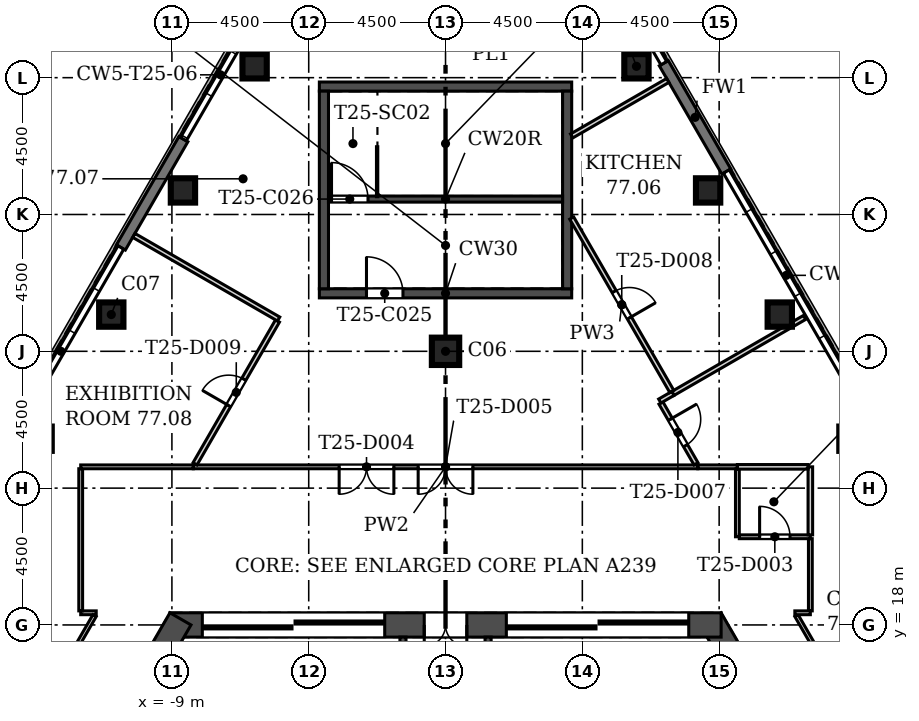
"""IFC4 building model, lengths in metres.
Left out: names, types, materials, properties, quantities, classifications, styles, units other than length and angle.
Written with IfcOpenShell. Run it as: python <this file> out.ifc"""

import sys

from ifc_helpers import new_model, si_unit, direction, frame, frame_2d, origin, origin_2d, place, context, subcontext, project, spatial, rectangle, extrude, element, fill, save


model = new_model("IFC4")
c1 = context("Model", 3, precision=1e-05, world=origin(), true_north=direction((0.0, 1.0)))
c2 = subcontext(c1, "Body", "Model", "MODEL_VIEW")
j1 = project(units=[si_unit("LENGTHUNIT", "METRE"), si_unit("PLANEANGLEUNIT", "RADIAN")], contexts=[c1])
p1 = place(None, origin())
s1 = spatial("IfcSite", under=j1, at=p1, CompositionType="ELEMENT")
p2 = place(p1, origin())
s2 = spatial("IfcBuilding", under=s1, at=p2, CompositionType="ELEMENT")
p3 = place(p2, frame((0.0, 0.0, 339.3)))
s3 = spatial("IfcBuildingStorey", under=s2, at=p3, CompositionType="ELEMENT", Elevation=339.3)
for number, where, z_axis, x_axis in (
    (1, (10.994, 28.208, 0.0), (0.0, 0.0, 1.0), (1.0, 0.0, 0.0)),
    (2, (8.637, 32.291, 0.0), (0.0, 0.0, 1.0), (1.0, 0.0, 0.0)),
    (3, (6.28, 36.374, 0.0), (0.0, 0.0, 1.0), (1.0, 0.0, 0.0)),
    (4, (-6.28, 36.374, 0.0), (0.0, 0.0, 1.0), (1.0, 0.0, 0.0)),
    (5, (-8.637, 32.291, 0.0), (0.0, 0.0, 1.0), (1.0, 0.0, 0.0)),
    (6, (-10.994, 28.208, 0.0), (0.0, 0.0, 1.0), (1.0, 0.0, 0.0)),
):
    element("IfcColumn", number, at=place(p3, frame(where, z_axis=z_axis, x_axis=x_axis)), inside=s3, PredefinedType="COLUMN", context=c2, shape_type="SweptSolid", body=[
        extrude(rectangle(XDim=0.8, YDim=0.8, at=origin_2d()), origin(), (0.0, 0.0, 1.0), 5.4),
    ])
p4 = place(p3, frame((0.0, 27.0, 0.0), z_axis=(0.0, 0.0, 1.0), x_axis=(1.0, 0.0, 0.0)))
e7 = element("IfcColumn", 7, at=p4, inside=s3, PredefinedType="COLUMN", context=c2, shape_type="SweptSolid", body=[
    extrude(rectangle(XDim=0.9, YDim=0.9, at=origin_2d()), origin(), (0.0, 0.0, 1.0), 5.4),
])
p5 = place(p3, frame((13.054, 10.692, 0.0), z_axis=(0.0, 0.0, 1.0), x_axis=(-0.500015780397, 0.866016292776, 0.0)))
e8 = element("IfcWall", 8, at=p5, inside=s3, PredefinedType="SHEAR", context=c2, shape_type="SweptSolid", body=[
    extrude(rectangle(XDim=8.67, YDim=0.8, at=frame_2d((4.335, 0.0))), origin(), (0.0, 0.0, 1.0), 5.4),
])
p6 = place(p3, frame((9.065, 18.0, 0.0), z_axis=(0.0, 0.0, 1.0), x_axis=(-1.0, 0.0, 0.0)))
e9 = element("IfcWall", 9, at=p6, inside=s3, PredefinedType="SHEAR", context=c2, shape_type="SweptSolid", body=[
    extrude(rectangle(XDim=18.13, YDim=0.8, at=frame_2d((9.065, 0.0))), origin(), (0.0, 0.0, 1.0), 5.4),
])
p7 = place(p6, frame((8.365, 0.0, 0.0)))
e10 = element("IfcOpeningElement", 10, at=p7, cuts=e9, PredefinedType="OPENING", context=c2, shape_type="SweptSolid", body=[
    extrude(rectangle(XDim=1.4, YDim=2.1, at=frame_2d((0.7, 1.05))), frame((0.0, 0.41, 0.0), z_axis=(0.0, -1.0, 0.0), x_axis=(1.0, 0.0, 0.0)), (0.0, 0.0, 1.0), 0.82),
])
p8 = place(p6, frame((11.065, 0.0, 0.0)))
e11 = element("IfcOpeningElement", 11, at=p8, cuts=e9, PredefinedType="OPENING", context=c2, shape_type="SweptSolid", body=[
    extrude(rectangle(XDim=6.0, YDim=2.4, at=frame_2d((3.0, 1.2))), frame((0.0, 0.41, 0.0), z_axis=(0.0, -1.0, 0.0), x_axis=(1.0, 0.0, 0.0)), (0.0, 0.0, 1.0), 0.82),
])
p9 = place(p6, frame((1.065, 0.0, 0.0)))
e12 = element("IfcOpeningElement", 12, at=p9, cuts=e9, PredefinedType="OPENING", context=c2, shape_type="SweptSolid", body=[
    extrude(rectangle(XDim=6.0, YDim=2.4, at=frame_2d((3.0, 1.2))), frame((0.0, 0.41, 0.0), z_axis=(0.0, -1.0, 0.0), x_axis=(1.0, 0.0, 0.0)), (0.0, 0.0, 1.0), 0.82),
])
p10 = place(p3, frame((-8.719, 18.2, 0.0), z_axis=(0.0, 0.0, 1.0), x_axis=(-0.500015780397, -0.866016292776, 0.0)))
e13 = element("IfcWall", 13, at=p10, inside=s3, PredefinedType="SHEAR", context=c2, shape_type="SweptSolid", body=[
    extrude(rectangle(XDim=8.67, YDim=0.8, at=frame_2d((4.335, 0.0))), origin(), (0.0, 0.0, 1.0), 5.4),
])
for number, where, z_axis, x_axis in (
    (14, (9.237, 32.913, 0.0), (0.0, 0.0, 1.0), (-0.5, 0.866, 0.0)),
    (15, (-8.622, 33.978, 0.0), (0.0, 0.0, 1.0), (-0.5, -0.866, 0.0)),
):
    element("IfcWall", number, at=place(p3, frame(where, z_axis=z_axis, x_axis=x_axis)), inside=s3, PredefinedType="SOLIDWALL", context=c2, shape_type="SweptSolid", body=[
        extrude(rectangle(XDim=4.115, YDim=0.34, at=frame_2d((2.058, 0.0))), origin(), (0.0, 0.0, 1.0), 4.6),
    ])
p11 = place(p3, frame((-1.4, 5.85, -0.4), z_axis=(0.0, 0.0, 1.0), x_axis=(0.0, 1.0, 0.0)))
e16 = element("IfcWall", 16, at=p11, inside=s3, PredefinedType="SOLIDWALL", context=c2, shape_type="SweptSolid", body=[
    extrude(rectangle(XDim=11.75, YDim=0.2, at=frame_2d((5.875, 0.0))), origin(), (0.0, 0.0, 1.0), 5.0),
])
p12 = place(p11, frame((0.65, 0.0, 0.4)))
e17 = element("IfcOpeningElement", 17, at=p12, cuts=e16, PredefinedType="OPENING", context=c2, shape_type="SweptSolid", body=[
    extrude(rectangle(XDim=1.1, YDim=2.1, at=frame_2d((0.55, 1.05))), frame((0.0, 0.11, 0.0), z_axis=(0.0, -1.0, 0.0), x_axis=(1.0, 0.0, 0.0)), (0.0, 0.0, 1.0), 0.22),
])
p13 = place(p11, frame((3.3, 0.0, 0.4)))
e18 = element("IfcOpeningElement", 18, at=p13, cuts=e16, PredefinedType="OPENING", context=c2, shape_type="SweptSolid", body=[
    extrude(rectangle(XDim=1.0, YDim=2.1, at=frame_2d((0.5, 1.05))), frame((0.0, 0.11, 0.0), z_axis=(0.0, -1.0, 0.0), x_axis=(1.0, 0.0, 0.0)), (0.0, 0.0, 1.0), 0.22),
])
p14 = place(p11, frame((7.2, 0.0, 0.4)))
e19 = element("IfcOpeningElement", 19, at=p14, cuts=e16, PredefinedType="OPENING", context=c2, shape_type="SweptSolid", body=[
    extrude(rectangle(XDim=1.0, YDim=2.1, at=frame_2d((0.5, 1.05))), frame((0.0, 0.11, 0.0), z_axis=(0.0, -1.0, 0.0), x_axis=(1.0, 0.0, 0.0)), (0.0, 0.0, 1.0), 0.22),
])
p15 = place(p3, frame((1.4, 5.85, -0.4), z_axis=(0.0, 0.0, 1.0), x_axis=(0.0, 1.0, 0.0)))
e20 = element("IfcWall", 20, at=p15, inside=s3, PredefinedType="SOLIDWALL", context=c2, shape_type="SweptSolid", body=[
    extrude(rectangle(XDim=11.75, YDim=0.2, at=frame_2d((5.875, 0.0))), origin(), (0.0, 0.0, 1.0), 5.0),
])
p16 = place(p15, frame((3.2, 0.0, 0.4)))
e21 = element("IfcOpeningElement", 21, at=p16, cuts=e20, PredefinedType="OPENING", context=c2, shape_type="SweptSolid", body=[
    extrude(rectangle(XDim=1.2, YDim=2.1, at=frame_2d((0.6, 1.05))), frame((0.0, 0.11, 0.0), z_axis=(0.0, -1.0, 0.0), x_axis=(1.0, 0.0, 0.0)), (0.0, 0.0, 1.0), 0.22),
])
p17 = place(p15, frame((0.65, 0.0, 0.4)))
e22 = element("IfcOpeningElement", 22, at=p17, cuts=e20, PredefinedType="OPENING", context=c2, shape_type="SweptSolid", body=[
    extrude(rectangle(XDim=1.1, YDim=2.1, at=frame_2d((0.55, 1.05))), frame((0.0, 0.11, 0.0), z_axis=(0.0, -1.0, 0.0), x_axis=(1.0, 0.0, 0.0)), (0.0, 0.0, 1.0), 0.22),
])
p18 = place(p15, frame((5.9, 0.0, 0.4)))
e23 = element("IfcOpeningElement", 23, at=p18, cuts=e20, PredefinedType="OPENING", context=c2, shape_type="SweptSolid", body=[
    extrude(rectangle(XDim=1.0, YDim=2.1, at=frame_2d((0.5, 1.05))), frame((0.0, 0.11, 0.0), z_axis=(0.0, -1.0, 0.0), x_axis=(1.0, 0.0, 0.0)), (0.0, 0.0, 1.0), 0.22),
])
p19 = place(p3, frame((-4.15, 28.907, -0.4), z_axis=(0.0, 0.0, 1.0), x_axis=(1.0, 0.0, 0.0)))
e24 = element("IfcWall", 24, at=p19, inside=s3, PredefinedType="SOLIDWALL", context=c2, shape_type="SweptSolid", body=[
    extrude(rectangle(XDim=8.3, YDim=0.3, at=frame_2d((4.15, 0.0))), origin(), (0.0, 0.0, 1.0), 5.0),
])
p20 = place(p19, frame((1.55, 0.0, 0.4)))
e25 = element("IfcOpeningElement", 25, at=p20, cuts=e24, PredefinedType="OPENING", context=c2, shape_type="SweptSolid", body=[
    extrude(rectangle(XDim=1.2, YDim=2.1, at=frame_2d((0.6, 1.05))), frame((0.0, 0.16, 0.0), z_axis=(0.0, -1.0, 0.0), x_axis=(1.0, 0.0, 0.0)), (0.0, 0.0, 1.0), 0.32),
])
p21 = place(p3, frame((-4.15, 35.707, -0.4), z_axis=(0.0, 0.0, 1.0), x_axis=(1.0, 0.0, 0.0)))
e26 = element("IfcWall", 26, at=p21, inside=s3, PredefinedType="SOLIDWALL", context=c2, shape_type="SweptSolid", body=[
    extrude(rectangle(XDim=8.3, YDim=0.3, at=frame_2d((4.15, 0.0))), origin(), (0.0, 0.0, 1.0), 5.0),
])
for number, where, z_axis, x_axis in (
    (27, (-4.0, 29.057, -0.4), (0.0, 0.0, 1.0), (0.0, 1.0, 0.0)),
    (28, (4.0, 29.057, -0.4), (0.0, 0.0, 1.0), (0.0, 1.0, 0.0)),
):
    element("IfcWall", number, at=place(p3, frame(where, z_axis=z_axis, x_axis=x_axis)), inside=s3, PredefinedType="SOLIDWALL", context=c2, shape_type="SweptSolid", body=[
        extrude(rectangle(XDim=6.5, YDim=0.3, at=frame_2d((3.25, 0.0))), origin(), (0.0, 0.0, 1.0), 5.0),
    ])
p22 = place(p3, frame((-3.85, 32.007, -0.4), z_axis=(0.0, 0.0, 1.0), x_axis=(1.0, 0.0, 0.0)))
e29 = element("IfcWall", 29, at=p22, inside=s3, PredefinedType="SOLIDWALL", context=c2, shape_type="SweptSolid", body=[
    extrude(rectangle(XDim=7.7, YDim=0.2, at=frame_2d((3.85, 0.0))), origin(), (0.0, 0.0, 1.0), 5.0),
])
p23 = place(p22, frame((0.1, 0.0, 0.4)))
e30 = element("IfcOpeningElement", 30, at=p23, cuts=e29, PredefinedType="OPENING", context=c2, shape_type="SweptSolid", body=[
    extrude(rectangle(XDim=1.2, YDim=2.1, at=frame_2d((0.6, 1.05))), frame((0.0, 0.11, 0.0), z_axis=(0.0, -1.0, 0.0), x_axis=(1.0, 0.0, 0.0)), (0.0, 0.0, 1.0), 0.22),
])
p24 = place(p3, frame((11.544, 18.306, 0.0), z_axis=(0.0, 0.0, 1.0), x_axis=(0.500007048974, -0.866021334019, 0.0)))
e31 = element("IfcWall", 31, at=p24, inside=s3, PredefinedType="PARTITIONING", context=c2, shape_type="SweptSolid", body=[
    extrude(rectangle(XDim=3.639, YDim=0.125, at=frame_2d((1.819, 0.0))), origin(), (0.0, 0.0, 1.0), 4.6),
])
p25 = place(p3, frame((8.297, 23.2, 0.0), z_axis=(0.0, 0.0, 1.0), x_axis=(1.0, 0.0, 0.0)))
e32 = element("IfcWall", 32, at=p25, inside=s3, PredefinedType="PARTITIONING", context=c2, shape_type="SweptSolid", body=[
    extrude(rectangle(XDim=1.303, YDim=0.125, at=frame_2d((0.651, 0.0))), origin(), (0.0, 0.0, 1.0), 4.6),
])
p26 = place(p3, frame((12.0, 20.837, 0.0), z_axis=(0.0, 0.0, 1.0), x_axis=(0.0, -1.0, 0.0)))
e33 = element("IfcWall", 33, at=p26, inside=s3, PredefinedType="PARTITIONING", context=c2, shape_type="SweptSolid", body=[
    extrude(rectangle(XDim=2.375, YDim=0.125, at=frame_2d((1.187, 0.0))), origin(), (0.0, 0.0, 1.0), 4.6),
])
p27 = place(p3, frame((12.0, 18.4, 0.0), z_axis=(0.0, 0.0, 1.0), x_axis=(-1.0, 0.0, 0.0)))
e34 = element("IfcWall", 34, at=p27, inside=s3, PredefinedType="PARTITIONING", context=c2, shape_type="SweptSolid", body=[
    extrude(rectangle(XDim=0.51, YDim=0.125, at=frame_2d((0.255, 0.0))), origin(), (0.0, 0.0, 1.0), 4.6),
])
p28 = place(p3, frame((9.6, 23.125, 0.0), z_axis=(0.0, 0.0, 1.0), x_axis=(0.0, -1.0, 0.0)))
e35 = element("IfcWall", 35, at=p28, inside=s3, PredefinedType="PARTITIONING", context=c2, shape_type="SweptSolid", body=[
    extrude(rectangle(XDim=2.225, YDim=0.125, at=frame_2d((1.113, 0.0))), origin(), (0.0, 0.0, 1.0), 4.6),
])
p29 = place(p3, frame((9.663, 20.9, 0.0), z_axis=(0.0, 0.0, 1.0), x_axis=(1.0, 0.0, 0.0)))
e36 = element("IfcWall", 36, at=p29, inside=s3, PredefinedType="PARTITIONING", context=c2, shape_type="SweptSolid", body=[
    extrude(rectangle(XDim=2.337, YDim=0.125, at=frame_2d((1.169, 0.0))), origin(), (0.0, 0.0, 1.0), 4.6),
])
p30 = place(p29, frame((0.669, 0.0, 0.0)))
e37 = element("IfcOpeningElement", 37, at=p30, cuts=e36, PredefinedType="OPENING", context=c2, shape_type="SweptSolid", body=[
    extrude(rectangle(XDim=1.0, YDim=2.1, at=frame_2d((0.5, 1.05))), frame((0.0, 0.073, 0.0), z_axis=(0.0, -1.0, 0.0), x_axis=(1.0, 0.0, 0.0)), (0.0, 0.0, 1.0), 0.145),
])
p31 = place(p3, frame((-8.297, 23.2, 0.0), z_axis=(0.0, 0.0, 1.0), x_axis=(1.0, 0.0, 0.0)))
e38 = element("IfcWall", 38, at=p31, inside=s3, PredefinedType="PARTITIONING", context=c2, shape_type="SweptSolid", body=[
    extrude(rectangle(XDim=16.594, YDim=0.125, at=frame_2d((8.297, 0.0))), origin(), (0.0, 0.0, 1.0), 4.6),
])
p32 = place(p31, frame((4.798, 0.0, 0.0)))
e39 = element("IfcOpeningElement", 39, at=p32, cuts=e38, PredefinedType="OPENING", context=c2, shape_type="SweptSolid", body=[
    extrude(rectangle(XDim=1.8, YDim=2.1, at=frame_2d((0.9, 1.05))), frame((0.0, 0.073, 0.0), z_axis=(0.0, -1.0, 0.0), x_axis=(1.0, 0.0, 0.0)), (0.0, 0.0, 1.0), 0.145),
])
p33 = place(p31, frame((7.397, 0.0, 0.0)))
e40 = element("IfcOpeningElement", 40, at=p33, cuts=e38, PredefinedType="OPENING", context=c2, shape_type="SweptSolid", body=[
    extrude(rectangle(XDim=1.8, YDim=2.1, at=frame_2d((0.9, 1.05))), frame((0.0, 0.073, 0.0), z_axis=(0.0, -1.0, 0.0), x_axis=(1.0, 0.0, 0.0)), (0.0, 0.0, 1.0), 0.145),
])
p34 = place(p3, frame((-11.49, 18.4, 0.0), z_axis=(0.0, 0.0, 1.0), x_axis=(-1.0, 0.0, 0.0)))
e41 = element("IfcWall", 41, at=p34, inside=s3, PredefinedType="PARTITIONING", context=c2, shape_type="SweptSolid", body=[
    extrude(rectangle(XDim=0.51, YDim=0.125, at=frame_2d((0.255, 0.0))), origin(), (0.0, 0.0, 1.0), 4.6),
])
p35 = place(p3, frame((-12.0, 18.462, 0.0), z_axis=(0.0, 0.0, 1.0), x_axis=(0.0, 1.0, 0.0)))
e42 = element("IfcWall", 42, at=p35, inside=s3, PredefinedType="PARTITIONING", context=c2, shape_type="SweptSolid", body=[
    extrude(rectangle(XDim=4.675, YDim=0.125, at=frame_2d((2.337, 0.0))), origin(), (0.0, 0.0, 1.0), 4.6),
])
p36 = place(p3, frame((-12.0, 23.2, 0.0), z_axis=(0.0, 0.0, 1.0), x_axis=(1.0, 0.0, 0.0)))
e43 = element("IfcWall", 43, at=p36, inside=s3, PredefinedType="PARTITIONING", context=c2, shape_type="SweptSolid", body=[
    extrude(rectangle(XDim=3.703, YDim=0.125, at=frame_2d((1.852, 0.0))), origin(), (0.0, 0.0, 1.0), 4.6),
])
p37 = place(p3, frame((-13.306, 15.254, 0.0), z_axis=(0.0, 0.0, 1.0), x_axis=(0.499984357326, 0.866034434898, 0.0)))
e44 = element("IfcWall", 44, at=p37, inside=s3, PredefinedType="PARTITIONING", context=c2, shape_type="SweptSolid", body=[
    extrude(rectangle(XDim=3.523, YDim=0.125, at=frame_2d((1.762, 0.0))), origin(), (0.0, 0.0, 1.0), 4.6),
])
p38 = place(p3, frame((12.0, 20.963, 0.0), z_axis=(0.0, 0.0, 1.0), x_axis=(0.0, 1.0, 0.0)))
e45 = element("IfcWall", 45, at=p38, inside=s3, PredefinedType="PARTITIONING", context=c2, shape_type="SweptSolid", body=[
    extrude(rectangle(XDim=2.237, YDim=0.15, at=frame_2d((1.119, 0.0))), origin(), (0.0, 0.0, 1.0), 4.6),
])
p39 = place(p3, frame((11.925, 23.2, 0.0), z_axis=(0.0, 0.0, 1.0), x_axis=(-1.0, 0.0, 0.0)))
e46 = element("IfcWall", 46, at=p39, inside=s3, PredefinedType="PARTITIONING", context=c2, shape_type="SweptSolid", body=[
    extrude(rectangle(XDim=2.325, YDim=0.15, at=frame_2d((1.163, 0.0))), origin(), (0.0, 0.0, 1.0), 4.6),
])
p40 = place(p3, frame((7.48, 25.615, 0.0), z_axis=(0.0, 0.0, 1.0), x_axis=(0.866046596414, 0.499963291492, 0.0)))
e47 = element("IfcWall", 47, at=p40, inside=s3, PredefinedType="PARTITIONING", context=c2, shape_type="SweptSolid", body=[
    extrude(rectangle(XDim=4.387, YDim=0.15, at=frame_2d((2.194, 0.0))), origin(), (0.0, 0.0, 1.0), 4.6),
])
p41 = place(p3, frame((11.394, 27.874, 0.0), z_axis=(0.0, 0.0, 1.0), x_axis=(0.865889515344, 0.500235291855, 0.0)))
e48 = element("IfcWall", 48, at=p41, inside=s3, PredefinedType="PARTITIONING", context=c2, shape_type="SweptSolid", body=[
    extrude(rectangle(XDim=0.481, YDim=0.15, at=frame_2d((0.24, 0.0))), origin(), (0.0, 0.0, 1.0), 4.6),
])
p42 = place(p3, frame((8.239, 23.3, 0.0), z_axis=(0.0, 0.0, 1.0), x_axis=(-0.499972710878, 0.866041158593, 0.0)))
e49 = element("IfcWall", 49, at=p42, inside=s3, PredefinedType="PARTITIONING", context=c2, shape_type="SweptSolid", body=[
    extrude(rectangle(XDim=2.308, YDim=0.15, at=frame_2d((1.154, 0.0))), origin(), (0.0, 0.0, 1.0), 4.6),
])
p43 = place(p42, frame((0.691, 0.0, 0.0)))
e50 = element("IfcOpeningElement", 50, at=p43, cuts=e49, PredefinedType="OPENING", context=c2, shape_type="SweptSolid", body=[
    extrude(rectangle(XDim=1.0, YDim=2.1, at=frame_2d((0.5, 1.05))), frame((0.0, 0.085, 0.0), z_axis=(0.0, -1.0, 0.0), x_axis=(1.0, 0.0, 0.0)), (0.0, 0.0, 1.0), 0.17),
])
p44 = place(p3, frame((7.047, 25.365, 0.0), z_axis=(0.0, 0.0, 1.0), x_axis=(0.866071776036, 0.499919672301, 0.0)))
e51 = element("IfcWall", 51, at=p44, inside=s3, PredefinedType="PARTITIONING", context=c2, shape_type="SweptSolid", body=[
    extrude(rectangle(XDim=0.5, YDim=0.15, at=frame_2d((0.25, 0.0))), origin(), (0.0, 0.0, 1.0), 4.6),
])
p45 = place(p3, frame((7.443, 25.679, 0.0), z_axis=(0.0, 0.0, 1.0), x_axis=(-0.500014467694, 0.866017050696, 0.0)))
e52 = element("IfcWall", 52, at=p45, inside=s3, PredefinedType="PARTITIONING", context=c2, shape_type="SweptSolid", body=[
    extrude(rectangle(XDim=6.586, YDim=0.15, at=frame_2d((3.293, 0.0))), origin(), (0.0, 0.0, 1.0), 4.6),
])
p46 = place(p45, frame((2.793, 0.0, 0.0)))
e53 = element("IfcOpeningElement", 53, at=p46, cuts=e52, PredefinedType="OPENING", context=c2, shape_type="SweptSolid", body=[
    extrude(rectangle(XDim=1.0, YDim=2.1, at=frame_2d((0.5, 1.05))), frame((0.0, 0.085, 0.0), z_axis=(0.0, -1.0, 0.0), x_axis=(1.0, 0.0, 0.0)), (0.0, 0.0, 1.0), 0.17),
])
p47 = place(p3, frame((4.15, 34.084, 0.0), z_axis=(0.0, 0.0, 1.0), x_axis=(0.866036312054, 0.499981105847, 0.0)))
e54 = element("IfcWall", 54, at=p47, inside=s3, PredefinedType="PARTITIONING", context=c2, shape_type="SweptSolid", body=[
    extrude(rectangle(XDim=3.65, YDim=0.15, at=frame_2d((1.825, 0.0))), origin(), (0.0, 0.0, 1.0), 4.6),
])
p48 = place(p3, frame((-8.239, 23.3, 0.0), z_axis=(0.0, 0.0, 1.0), x_axis=(0.499997823047, 0.866026660645, 0.0)))
e55 = element("IfcWall", 55, at=p48, inside=s3, PredefinedType="PARTITIONING", context=c2, shape_type="SweptSolid", body=[
    extrude(rectangle(XDim=5.423, YDim=0.15, at=frame_2d((2.712, 0.0))), origin(), (0.0, 0.0, 1.0), 4.6),
])
p49 = place(p48, frame((2.212, 0.0, 0.0)))
e56 = element("IfcOpeningElement", 56, at=p49, cuts=e55, PredefinedType="OPENING", context=c2, shape_type="SweptSolid", body=[
    extrude(rectangle(XDim=1.0, YDim=2.1, at=frame_2d((0.5, 1.05))), frame((0.0, 0.085, 0.0), z_axis=(0.0, -1.0, 0.0), x_axis=(1.0, 0.0, 0.0)), (0.0, 0.0, 1.0), 0.17),
])
p50 = place(p3, frame((-5.49, 28.062, 0.0), z_axis=(0.0, 0.0, 1.0), x_axis=(-0.866027397988, 0.499996545922, 0.0)))
e57 = element("IfcWall", 57, at=p50, inside=s3, PredefinedType="PARTITIONING", context=c2, shape_type="SweptSolid", body=[
    extrude(rectangle(XDim=5.5, YDim=0.15, at=frame_2d((2.75, 0.0))), origin(), (0.0, 0.0, 1.0), 4.6),
])
p51 = place(p7, origin())
e58 = element("IfcDoor", 58, at=p51, inside=s3, OperationType="DOUBLE_DOOR_SINGLE_SWING", PredefinedType="DOOR", context=c2, shape_type="SweptSolid", body=[
    extrude(rectangle(XDim=1.4, YDim=2.1, at=frame_2d((0.7, 1.05))), frame((0.0, 0.025, 0.0), z_axis=(0.0, -1.0, 0.0), x_axis=(1.0, 0.0, 0.0)), (0.0, 0.0, 1.0), 0.05),
])
fill(e10, e58)
p52 = place(p8, origin())
e59 = element("IfcDoor", 59, at=p52, inside=s3, OperationType="DOUBLE_DOOR_SLIDING", PredefinedType="DOOR", context=c2, shape_type="SweptSolid", body=[
    extrude(rectangle(XDim=6.0, YDim=2.4, at=frame_2d((3.0, 1.2))), frame((0.0, 0.025, 0.0), z_axis=(0.0, -1.0, 0.0), x_axis=(1.0, 0.0, 0.0)), (0.0, 0.0, 1.0), 0.05),
])
fill(e11, e59)
p53 = place(p9, origin())
e60 = element("IfcDoor", 60, at=p53, inside=s3, OperationType="DOUBLE_DOOR_SLIDING", PredefinedType="DOOR", context=c2, shape_type="SweptSolid", body=[
    extrude(rectangle(XDim=6.0, YDim=2.4, at=frame_2d((3.0, 1.2))), frame((0.0, 0.025, 0.0), z_axis=(0.0, -1.0, 0.0), x_axis=(1.0, 0.0, 0.0)), (0.0, 0.0, 1.0), 0.05),
])
fill(e12, e60)
p54 = place(p20, origin())
e61 = element("IfcDoor", 61, at=p54, inside=s3, OperationType="SINGLE_SWING_LEFT", PredefinedType="DOOR", context=c2, shape_type="SweptSolid", body=[
    extrude(rectangle(XDim=1.2, YDim=2.1, at=frame_2d((0.6, 1.05))), frame((0.0, 0.025, 0.0), z_axis=(0.0, -1.0, 0.0), x_axis=(1.0, 0.0, 0.0)), (0.0, 0.0, 1.0), 0.05),
])
fill(e25, e61)
p55 = place(p23, origin())
e62 = element("IfcDoor", 62, at=p55, inside=s3, OperationType="SINGLE_SWING_LEFT", PredefinedType="DOOR", context=c2, shape_type="SweptSolid", body=[
    extrude(rectangle(XDim=1.2, YDim=2.1, at=frame_2d((0.6, 1.05))), frame((0.0, 0.025, 0.0), z_axis=(0.0, -1.0, 0.0), x_axis=(1.0, 0.0, 0.0)), (0.0, 0.0, 1.0), 0.05),
])
fill(e30, e62)
p56 = place(p30, origin())
e63 = element("IfcDoor", 63, at=p56, inside=s3, OperationType="SINGLE_SWING_LEFT", PredefinedType="DOOR", context=c2, shape_type="SweptSolid", body=[
    extrude(rectangle(XDim=1.0, YDim=2.1, at=frame_2d((0.5, 1.05))), frame((0.0, 0.025, 0.0), z_axis=(0.0, -1.0, 0.0), x_axis=(1.0, 0.0, 0.0)), (0.0, 0.0, 1.0), 0.05),
])
fill(e37, e63)
p57 = place(p32, frame((1.8, 0.0, 0.0), z_axis=(0.0, 0.0, 1.0), x_axis=(-1.0, 0.0, 0.0)))
e64 = element("IfcDoor", 64, at=p57, inside=s3, OperationType="DOUBLE_DOOR_SINGLE_SWING", PredefinedType="DOOR", context=c2, shape_type="SweptSolid", body=[
    extrude(rectangle(XDim=1.8, YDim=2.1, at=frame_2d((0.9, 1.05))), frame((0.0, 0.025, 0.0), z_axis=(0.0, -1.0, 0.0), x_axis=(1.0, 0.0, 0.0)), (0.0, 0.0, 1.0), 0.05),
])
fill(e39, e64)
p58 = place(p33, frame((1.8, 0.0, 0.0), z_axis=(0.0, 0.0, 1.0), x_axis=(-1.0, 0.0, 0.0)))
e65 = element("IfcDoor", 65, at=p58, inside=s3, OperationType="DOUBLE_DOOR_SINGLE_SWING", PredefinedType="DOOR", context=c2, shape_type="SweptSolid", body=[
    extrude(rectangle(XDim=1.8, YDim=2.1, at=frame_2d((0.9, 1.05))), frame((0.0, 0.025, 0.0), z_axis=(0.0, -1.0, 0.0), x_axis=(1.0, 0.0, 0.0)), (0.0, 0.0, 1.0), 0.05),
])
fill(e40, e65)
p59 = place(p43, frame((1.0, 0.0, 0.0), z_axis=(0.0, 0.0, 1.0), x_axis=(-1.0, 0.0, 0.0)))
e66 = element("IfcDoor", 66, at=p59, inside=s3, OperationType="SINGLE_SWING_LEFT", PredefinedType="DOOR", context=c2, shape_type="SweptSolid", body=[
    extrude(rectangle(XDim=1.0, YDim=2.1, at=frame_2d((0.5, 1.05))), frame((0.0, 0.025, 0.0), z_axis=(0.0, -1.0, 0.0), x_axis=(1.0, 0.0, 0.0)), (0.0, 0.0, 1.0), 0.05),
])
fill(e50, e66)
p60 = place(p46, frame((1.0, 0.0, 0.0), z_axis=(0.0, 0.0, 1.0), x_axis=(-1.0, 0.0, 0.0)))
e67 = element("IfcDoor", 67, at=p60, inside=s3, OperationType="SINGLE_SWING_RIGHT", PredefinedType="DOOR", context=c2, shape_type="SweptSolid", body=[
    extrude(rectangle(XDim=1.0, YDim=2.1, at=frame_2d((0.5, 1.05))), frame((0.0, 0.025, 0.0), z_axis=(0.0, -1.0, 0.0), x_axis=(1.0, 0.0, 0.0)), (0.0, 0.0, 1.0), 0.05),
])
fill(e53, e67)
p61 = place(p49, origin())
e68 = element("IfcDoor", 68, at=p61, inside=s3, OperationType="SINGLE_SWING_LEFT", PredefinedType="DOOR", context=c2, shape_type="SweptSolid", body=[
    extrude(rectangle(XDim=1.0, YDim=2.1, at=frame_2d((0.5, 1.05))), frame((0.0, 0.025, 0.0), z_axis=(0.0, -1.0, 0.0), x_axis=(1.0, 0.0, 0.0)), (0.0, 0.0, 1.0), 0.05),
])
fill(e56, e68)
save(model, sys.argv[1])
